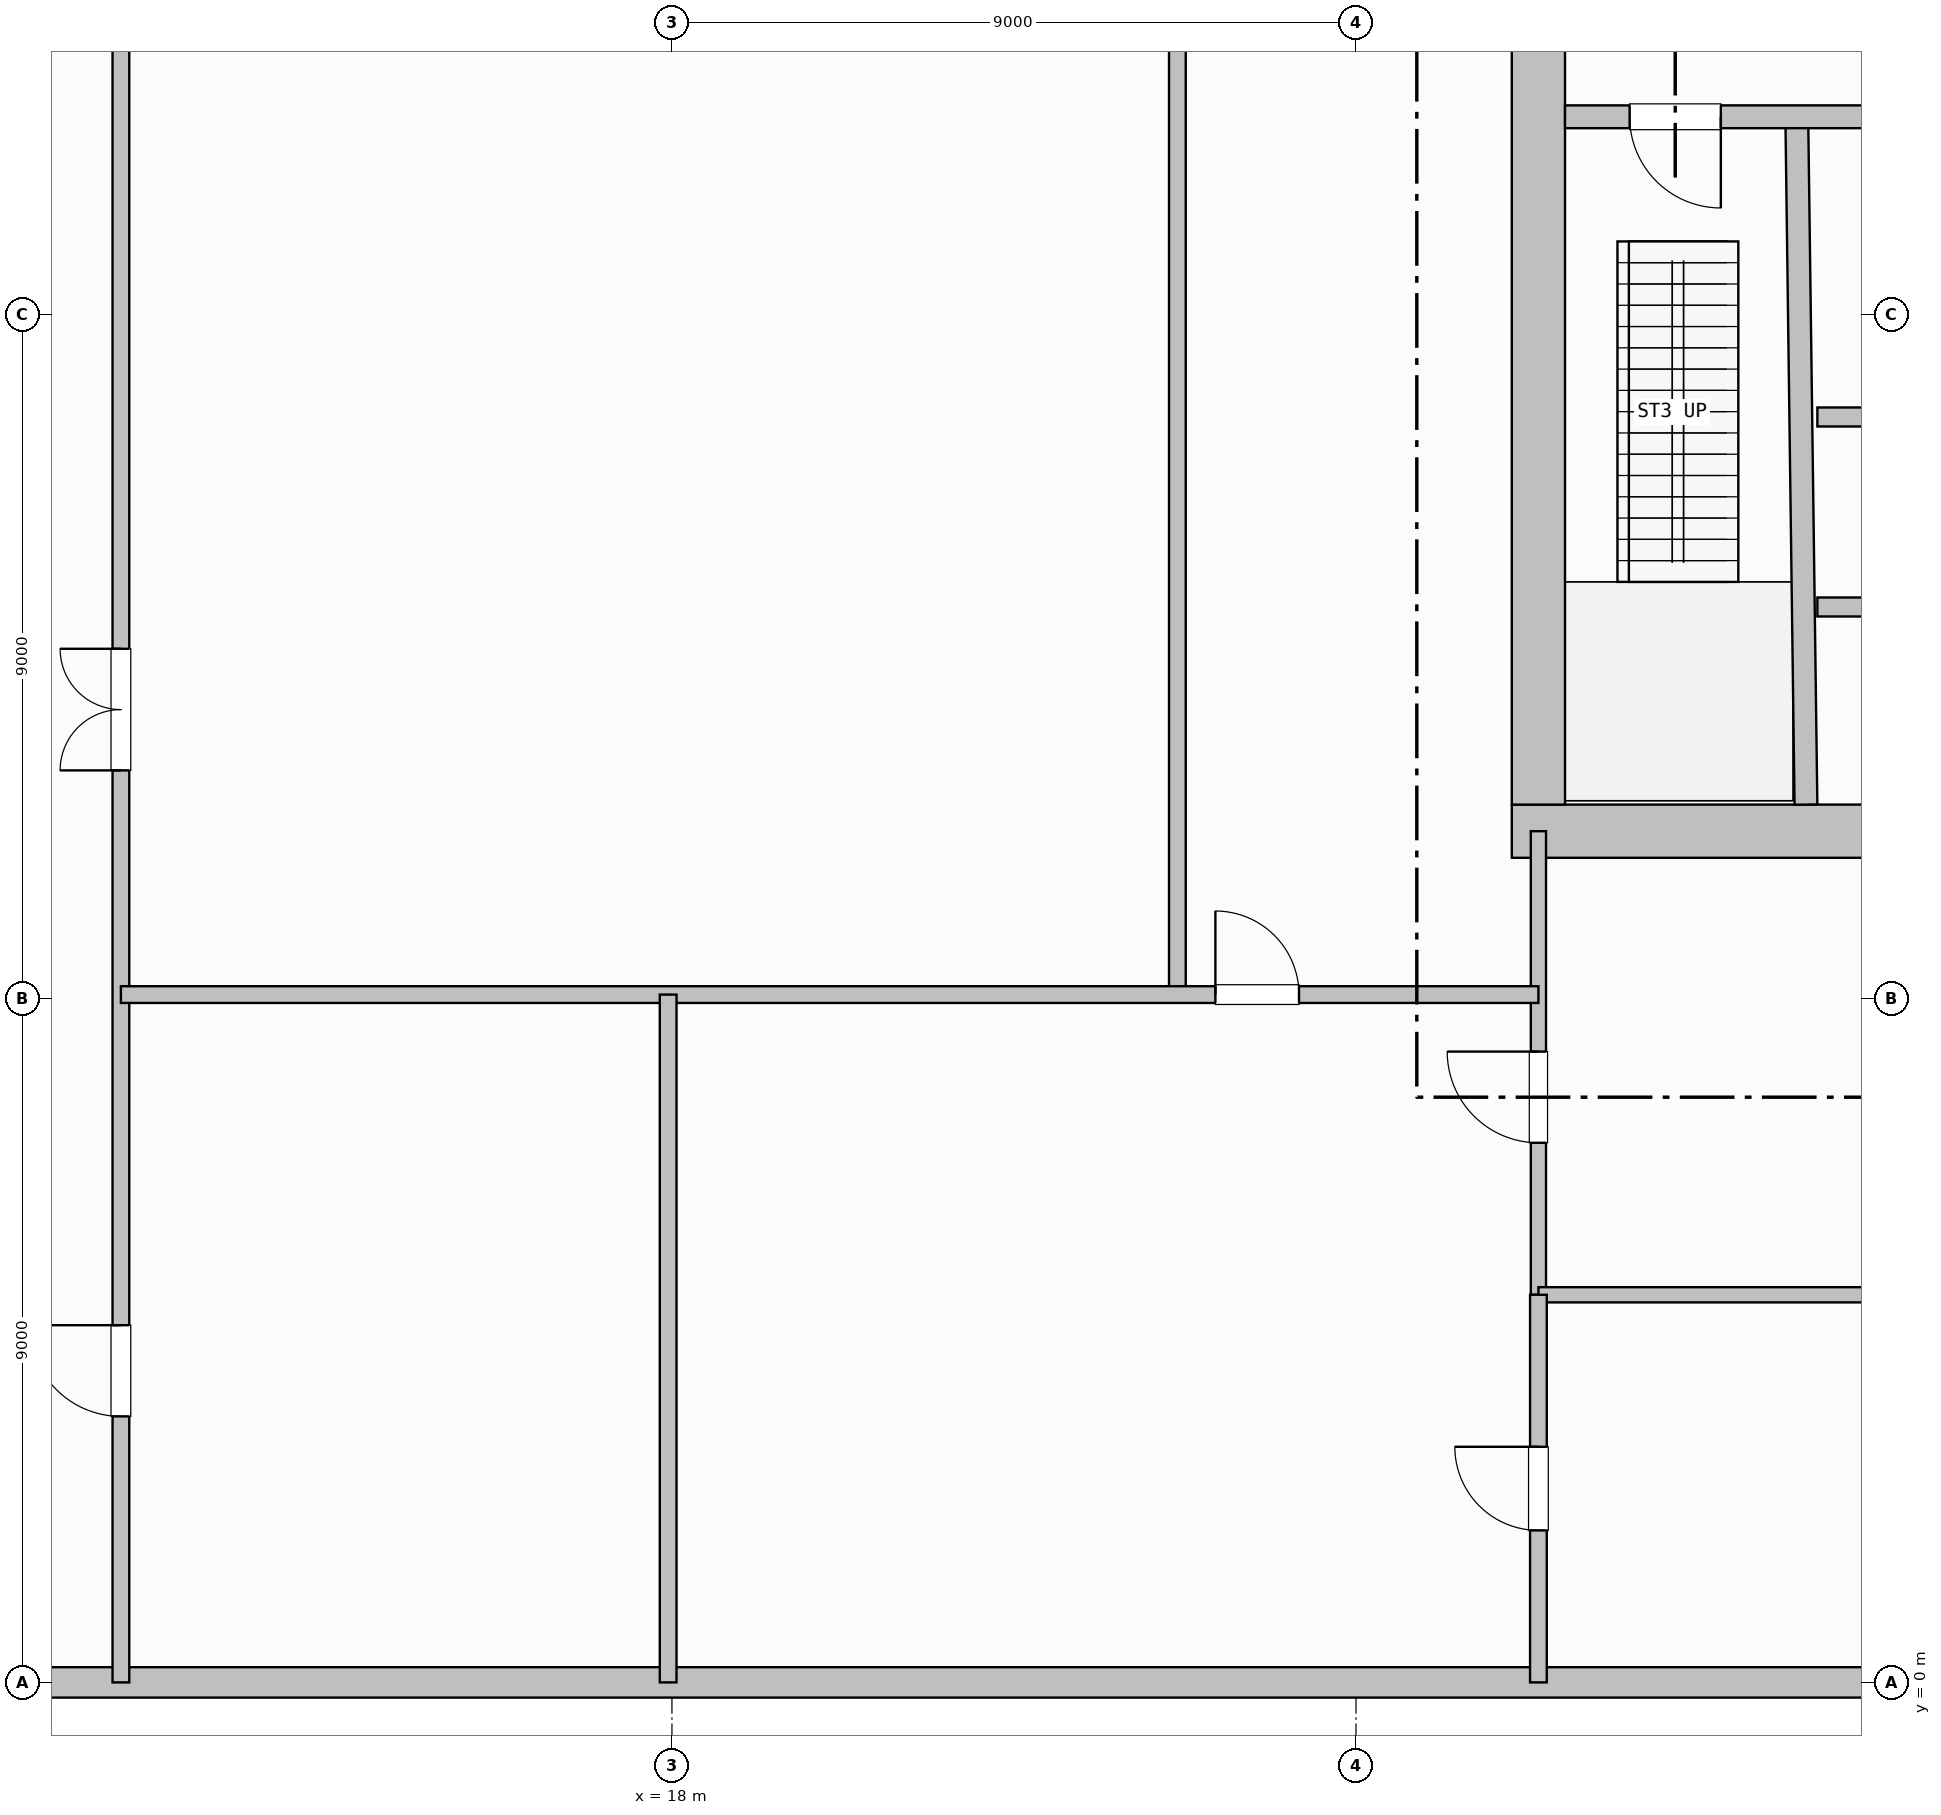
"""IFC4 building model, lengths in metres.
Left out: names, types, materials, properties, quantities, classifications, styles, units other than length and angle.
Written with IfcOpenShell. Run it as: python <this file> out.ifc"""

import sys

from ifc_helpers import new_model, si_unit, direction, frame, frame_2d, origin, origin_2d, place, context, subcontext, project, spatial, rectangle, i_section, extrude, element, fill, save


model = new_model("IFC4")
c1 = context("Model", 3, precision=1e-05, world=origin(), true_north=direction((0.0, 1.0)))
c2 = subcontext(c1, "Body", "Model", "MODEL_VIEW")
j1 = project(units=[si_unit("LENGTHUNIT", "METRE"), si_unit("PLANEANGLEUNIT", "RADIAN")], contexts=[c1])
p1 = place(None, origin())
s1 = spatial("IfcSite", under=j1, at=p1, CompositionType="ELEMENT")
p2 = place(p1, origin())
s2 = spatial("IfcBuilding", under=s1, at=p2, CompositionType="ELEMENT")
p3 = place(p2, origin())
s3 = spatial("IfcBuildingStorey", under=s2, at=p3, CompositionType="ELEMENT", Elevation=0.0)
for number, where, z_axis, x_axis in (
    (1, (18.0, 0.0, 0.0), (0.0, 0.0, 1.0), (1.0, 0.0, 0.0)),
    (2, (18.0, 9.0, 0.0), (0.0, 0.0, 1.0), (1.0, 0.0, 0.0)),
    (3, (27.0, 0.0, 0.0), (0.0, 0.0, 1.0), (1.0, 0.0, 0.0)),
    (4, (27.0, 9.0, 0.0), (0.0, 0.0, 1.0), (1.0, 0.0, 0.0)),
    (5, (18.0, 4.5, 0.0), (0.0, 0.0, 1.0), (1.0, 0.0, 0.0)),
    (6, (27.0, 4.5, 0.0), (0.0, 0.0, 1.0), (1.0, 0.0, 0.0)),
):
    element("IfcColumn", number, at=place(p3, frame(where, z_axis=z_axis, x_axis=x_axis)), inside=s3, PredefinedType="COLUMN", context=c2, shape_type="SweptSolid", body=[
        extrude(i_section(OverallWidth=0.454, OverallDepth=0.569, WebThickness=0.078, FlangeThickness=0.125, FilletRadius=0.015, at=origin_2d()), origin(), (0.0, 0.0, 1.0), 5.8),
    ])
p4 = place(p3, frame((62.8, 0.0, 0.0), z_axis=(0.0, 0.0, 1.0), x_axis=(-1.0, 0.0, 0.0)))
e7 = element("IfcWall", 7, at=p4, inside=s3, PredefinedType="SOLIDWALL", context=c2, shape_type="SweptSolid", body=[
    extrude(rectangle(XDim=62.6, YDim=0.4, at=frame_2d((31.3, 0.0))), origin(), (0.0, 0.0, 1.0), 5.48),
])
p5 = place(p4, frame((57.7, 0.0, 1.1)))
e8 = element("IfcOpeningElement", 8, at=p5, cuts=e7, PredefinedType="OPENING", context=c2, shape_type="SweptSolid", body=[
    extrude(rectangle(XDim=1.2, YDim=1.5, at=frame_2d((0.6, 0.75))), frame((0.0, 0.21, 0.0), z_axis=(0.0, -1.0, 0.0), x_axis=(1.0, 0.0, 0.0)), (0.0, 0.0, 1.0), 0.42),
])
p6 = place(p4, frame((48.1, 0.0, 1.1)))
e9 = element("IfcOpeningElement", 9, at=p6, cuts=e7, PredefinedType="OPENING", context=c2, shape_type="SweptSolid", body=[
    extrude(rectangle(XDim=2.4, YDim=1.95, at=frame_2d((1.2, 0.975))), frame((0.0, 0.21, 0.0), z_axis=(0.0, -1.0, 0.0), x_axis=(1.0, 0.0, 0.0)), (0.0, 0.0, 1.0), 0.42),
])
p7 = place(p4, frame((38.95, 0.0, 1.1)))
e10 = element("IfcOpeningElement", 10, at=p7, cuts=e7, PredefinedType="OPENING", context=c2, shape_type="SweptSolid", body=[
    extrude(rectangle(XDim=2.7, YDim=2.1, at=frame_2d((1.35, 1.05))), frame((0.0, 0.21, 0.0), z_axis=(0.0, -1.0, 0.0), x_axis=(1.0, 0.0, 0.0)), (0.0, 0.0, 1.0), 0.42),
])
p8 = place(p4, frame((29.8, 0.0, 1.1)))
e11 = element("IfcOpeningElement", 11, at=p8, cuts=e7, PredefinedType="OPENING", context=c2, shape_type="SweptSolid", body=[
    extrude(rectangle(XDim=3.0, YDim=2.25, at=frame_2d((1.5, 1.125))), frame((0.0, 0.21, 0.0), z_axis=(0.0, -1.0, 0.0), x_axis=(1.0, 0.0, 0.0)), (0.0, 0.0, 1.0), 0.42),
])
p9 = place(p4, frame((12.175, 0.0, 1.1)))
e12 = element("IfcOpeningElement", 12, at=p9, cuts=e7, PredefinedType="OPENING", context=c2, shape_type="SweptSolid", body=[
    extrude(rectangle(XDim=2.25, YDim=2.1, at=frame_2d((1.125, 1.05))), frame((0.0, 0.21, 0.0), z_axis=(0.0, -1.0, 0.0), x_axis=(1.0, 0.0, 0.0)), (0.0, 0.0, 1.0), 0.42),
])
p10 = place(p4, frame((3.025, 0.0, 1.1)))
e13 = element("IfcOpeningElement", 13, at=p10, cuts=e7, PredefinedType="OPENING", context=c2, shape_type="SweptSolid", body=[
    extrude(rectangle(XDim=2.55, YDim=2.25, at=frame_2d((1.275, 1.125))), frame((0.0, 0.21, 0.0), z_axis=(0.0, -1.0, 0.0), x_axis=(1.0, 0.0, 0.0)), (0.0, 0.0, 1.0), 0.42),
])
p11 = place(p3, frame((43.15, 11.2, 0.0), z_axis=(0.0, 0.0, 1.0), x_axis=(-1.0, 0.0, 0.0)))
e14 = element("IfcWall", 14, at=p11, inside=s3, PredefinedType="SHEAR", context=c2, shape_type="SweptSolid", body=[
    extrude(rectangle(XDim=14.1, YDim=0.7, at=frame_2d((7.05, 0.0))), origin(), (0.0, 0.0, 1.0), 5.48),
])
p12 = place(p3, frame((29.4, 24.25, 0.0), z_axis=(0.0, 0.0, 1.0), x_axis=(0.0, -1.0, 0.0)))
e15 = element("IfcWall", 15, at=p12, inside=s3, PredefinedType="SHEAR", context=c2, shape_type="SweptSolid", body=[
    extrude(rectangle(XDim=12.7, YDim=0.7, at=frame_2d((6.35, 0.0))), origin(), (0.0, 0.0, 1.0), 5.48),
])
p13 = place(p12, frame((1.35, 0.0, 0.0)))
e16 = element("IfcOpeningElement", 16, at=p13, cuts=e15, PredefinedType="OPENING", context=c2, shape_type="SweptSolid", body=[
    extrude(rectangle(XDim=1.35, YDim=2.15, at=frame_2d((0.675, 1.075))), frame((0.0, 0.36, 0.0), z_axis=(0.0, -1.0, 0.0), x_axis=(1.0, 0.0, 0.0)), (0.0, 0.0, 1.0), 0.72),
])
p14 = place(p3, frame((32.92, 11.55, 0.0), z_axis=(0.0, 0.0, 1.0), x_axis=(-0.01331804616, 0.99991131089, 0.0)))
e17 = element("IfcWall", 17, at=p14, inside=s3, PredefinedType="SHEAR", context=c2, shape_type="SweptSolid", body=[
    extrude(rectangle(XDim=9.001, YDim=0.3, at=frame_2d((4.5, 0.0))), origin(), (0.0, 0.0, 1.0), 5.48),
])
p15 = place(p3, frame((34.5, 20.6, 0.0), z_axis=(0.0, 0.0, 1.0), x_axis=(-1.0, 0.0, 0.0)))
e18 = element("IfcWall", 18, at=p15, inside=s3, PredefinedType="SHEAR", context=c2, shape_type="SweptSolid", body=[
    extrude(rectangle(XDim=4.75, YDim=0.3, at=frame_2d((2.375, 0.0))), origin(), (0.0, 0.0, 1.0), 5.48),
])
p16 = place(p15, frame((2.7, 0.0, 0.0)))
e19 = element("IfcOpeningElement", 19, at=p16, cuts=e18, PredefinedType="OPENING", context=c2, shape_type="SweptSolid", body=[
    extrude(rectangle(XDim=1.2, YDim=2.15, at=frame_2d((0.6, 1.075))), frame((0.0, 0.16, 0.0), z_axis=(0.0, -1.0, 0.0), x_axis=(1.0, 0.0, 0.0)), (0.0, 0.0, 1.0), 0.32),
])
p17 = place(p3, frame((33.07, 14.15, 0.0), z_axis=(0.0, 0.0, 1.0), x_axis=(1.0, 0.0, 0.0)))
e20 = element("IfcWall", 20, at=p17, inside=s3, PredefinedType="PARTITIONING", context=c2, shape_type="SweptSolid", body=[
    extrude(rectangle(XDim=9.38, YDim=0.25, at=frame_2d((4.69, 0.0))), origin(), (0.0, 0.0, 1.0), 5.48),
])
p18 = place(p17, frame((0.755, 0.0, 0.0)))
e21 = element("IfcOpeningElement", 21, at=p18, cuts=e20, PredefinedType="OPENING", context=c2, shape_type="SweptSolid", body=[
    extrude(rectangle(XDim=1.15, YDim=2.15, at=frame_2d((0.575, 1.075))), frame((0.0, 0.135, 0.0), z_axis=(0.0, -1.0, 0.0), x_axis=(1.0, 0.0, 0.0)), (0.0, 0.0, 1.0), 0.27),
])
p19 = place(p17, frame((3.355, 0.0, 0.0)))
e22 = element("IfcOpeningElement", 22, at=p19, cuts=e20, PredefinedType="OPENING", context=c2, shape_type="SweptSolid", body=[
    extrude(rectangle(XDim=1.15, YDim=2.15, at=frame_2d((0.575, 1.075))), frame((0.0, 0.135, 0.0), z_axis=(0.0, -1.0, 0.0), x_axis=(1.0, 0.0, 0.0)), (0.0, 0.0, 1.0), 0.27),
])
p20 = place(p17, frame((6.055, 0.0, 0.0)))
e23 = element("IfcOpeningElement", 23, at=p20, cuts=e20, PredefinedType="OPENING", context=c2, shape_type="SweptSolid", body=[
    extrude(rectangle(XDim=1.15, YDim=2.15, at=frame_2d((0.575, 1.075))), frame((0.0, 0.135, 0.0), z_axis=(0.0, -1.0, 0.0), x_axis=(1.0, 0.0, 0.0)), (0.0, 0.0, 1.0), 0.27),
])
p21 = place(p3, frame((40.98, 16.65, 0.0), z_axis=(0.0, 0.0, 1.0), x_axis=(-1.0, 0.0, 0.0)))
e24 = element("IfcWall", 24, at=p21, inside=s3, PredefinedType="PARTITIONING", context=c2, shape_type="SweptSolid", body=[
    extrude(rectangle(XDim=7.91, YDim=0.25, at=frame_2d((3.955, 0.0))), origin(), (0.0, 0.0, 1.0), 5.48),
])
p22 = place(p21, frame((6.005, 0.0, 0.0)))
e25 = element("IfcOpeningElement", 25, at=p22, cuts=e24, PredefinedType="OPENING", context=c2, shape_type="SweptSolid", body=[
    extrude(rectangle(XDim=1.15, YDim=2.15, at=frame_2d((0.575, 1.075))), frame((0.0, 0.135, 0.0), z_axis=(0.0, -1.0, 0.0), x_axis=(1.0, 0.0, 0.0)), (0.0, 0.0, 1.0), 0.27),
])
p23 = place(p21, frame((3.405, 0.0, 0.0)))
e26 = element("IfcOpeningElement", 26, at=p23, cuts=e24, PredefinedType="OPENING", context=c2, shape_type="SweptSolid", body=[
    extrude(rectangle(XDim=1.15, YDim=2.15, at=frame_2d((0.575, 1.075))), frame((0.0, 0.135, 0.0), z_axis=(0.0, -1.0, 0.0), x_axis=(1.0, 0.0, 0.0)), (0.0, 0.0, 1.0), 0.27),
])
p24 = place(p21, frame((0.705, 0.0, 0.0)))
e27 = element("IfcOpeningElement", 27, at=p24, cuts=e24, PredefinedType="OPENING", context=c2, shape_type="SweptSolid", body=[
    extrude(rectangle(XDim=1.15, YDim=2.15, at=frame_2d((0.575, 1.075))), frame((0.0, 0.135, 0.0), z_axis=(0.0, -1.0, 0.0), x_axis=(1.0, 0.0, 0.0)), (0.0, 0.0, 1.0), 0.27),
])
p25 = place(p3, frame((29.4, 5.1, 0.0), z_axis=(0.0, 0.0, 1.0), x_axis=(0.0, 1.0, 0.0)))
e28 = element("IfcWall", 28, at=p25, inside=s3, PredefinedType="PARTITIONING", context=c2, shape_type="SweptSolid", body=[
    extrude(rectangle(XDim=6.1, YDim=0.2, at=frame_2d((3.05, 0.0))), origin(), (0.0, 0.0, 1.0), 4.533),
])
p26 = place(p25, frame((2.0, 0.0, 0.0)))
e29 = element("IfcOpeningElement", 29, at=p26, cuts=e28, PredefinedType="OPENING", context=c2, shape_type="SweptSolid", body=[
    extrude(rectangle(XDim=1.2, YDim=2.15, at=frame_2d((0.6, 1.075))), frame((0.0, 0.11, 0.0), z_axis=(0.0, -1.0, 0.0), x_axis=(1.0, 0.0, 0.0)), (0.0, 0.0, 1.0), 0.22),
])
p27 = place(p3, frame((29.4, 5.1, 0.0), z_axis=(0.0, 0.0, 1.0), x_axis=(1.0, 0.0, 0.0)))
e30 = element("IfcWall", 30, at=p27, inside=s3, PredefinedType="PARTITIONING", context=c2, shape_type="SweptSolid", body=[
    extrude(rectangle(XDim=33.6, YDim=0.2, at=frame_2d((16.8, 0.0))), origin(), (0.0, 0.0, 1.0), 4.605),
])
p28 = place(p3, frame((10.75, 0.0, 0.0), z_axis=(0.0, 0.0, 1.0), x_axis=(0.0, 1.0, 0.0)))
e31 = element("IfcWall", 31, at=p28, inside=s3, PredefinedType="PARTITIONING", context=c2, shape_type="SweptSolid", body=[
    extrude(rectangle(XDim=25.0, YDim=0.22, at=frame_2d((12.5, 0.0))), origin(), (0.0, 0.0, 1.0), 4.512),
])
p29 = place(p28, frame((12.0, 0.0, 0.0)))
e32 = element("IfcOpeningElement", 32, at=p29, cuts=e31, PredefinedType="OPENING", context=c2, shape_type="SweptSolid", body=[
    extrude(rectangle(XDim=1.6, YDim=2.2, at=frame_2d((0.8, 1.1))), frame((0.0, 0.12, 0.0), z_axis=(0.0, -1.0, 0.0), x_axis=(1.0, 0.0, 0.0)), (0.0, 0.0, 1.0), 0.24),
])
p30 = place(p28, frame((3.5, 0.0, 0.0)))
e33 = element("IfcOpeningElement", 33, at=p30, cuts=e31, PredefinedType="OPENING", context=c2, shape_type="SweptSolid", body=[
    extrude(rectangle(XDim=1.2, YDim=2.15, at=frame_2d((0.6, 1.075))), frame((0.0, 0.12, 0.0), z_axis=(0.0, -1.0, 0.0), x_axis=(1.0, 0.0, 0.0)), (0.0, 0.0, 1.0), 0.24),
])
p31 = place(p3, frame((24.65, 9.05, 0.0), z_axis=(0.0, 0.0, 1.0), x_axis=(0.0, 1.0, 0.0)))
e34 = element("IfcWall", 34, at=p31, inside=s3, PredefinedType="PARTITIONING", context=c2, shape_type="SweptSolid", body=[
    extrude(rectangle(XDim=19.15, YDim=0.22, at=frame_2d((9.575, 0.0))), origin(), (0.0, 0.0, 1.0), 4.512),
])
p32 = place(p3, frame((10.75, 9.05, 0.0), z_axis=(0.0, 0.0, 1.0), x_axis=(1.0, 0.0, 0.0)))
e35 = element("IfcWall", 35, at=p32, inside=s3, PredefinedType="PARTITIONING", context=c2, shape_type="SweptSolid", body=[
    extrude(rectangle(XDim=18.65, YDim=0.22, at=frame_2d((9.325, 0.0))), origin(), (0.0, 0.0, 1.0), 4.533),
])
p33 = place(p32, frame((14.4, 0.0, 0.0)))
e36 = element("IfcOpeningElement", 36, at=p33, cuts=e35, PredefinedType="OPENING", context=c2, shape_type="SweptSolid", body=[
    extrude(rectangle(XDim=1.1, YDim=2.15, at=frame_2d((0.55, 1.075))), frame((0.0, 0.12, 0.0), z_axis=(0.0, -1.0, 0.0), x_axis=(1.0, 0.0, 0.0)), (0.0, 0.0, 1.0), 0.24),
])
p34 = place(p3, frame((17.95, 0.0, 0.0), z_axis=(0.0, 0.0, 1.0), x_axis=(0.0, 1.0, 0.0)))
e37 = element("IfcWall", 37, at=p34, inside=s3, PredefinedType="PARTITIONING", context=c2, shape_type="SweptSolid", body=[
    extrude(rectangle(XDim=9.05, YDim=0.22, at=frame_2d((4.525, 0.0))), origin(), (0.0, 0.0, 1.0), 4.533),
])
p35 = place(p3, frame((29.4, 0.0, 0.0), z_axis=(0.0, 0.0, 1.0), x_axis=(0.0, 1.0, 0.0)))
e38 = element("IfcWall", 38, at=p35, inside=s3, PredefinedType="PARTITIONING", context=c2, shape_type="SweptSolid", body=[
    extrude(rectangle(XDim=5.1, YDim=0.22, at=frame_2d((2.55, 0.0))), origin(), (0.0, 0.0, 1.0), 4.533),
])
p36 = place(p35, frame((2.0, 0.0, 0.0)))
e39 = element("IfcOpeningElement", 39, at=p36, cuts=e38, PredefinedType="OPENING", context=c2, shape_type="SweptSolid", body=[
    extrude(rectangle(XDim=1.1, YDim=2.15, at=frame_2d((0.55, 1.075))), frame((0.0, 0.12, 0.0), z_axis=(0.0, -1.0, 0.0), x_axis=(1.0, 0.0, 0.0)), (0.0, 0.0, 1.0), 0.24),
])
p37 = place(p6, origin())
e40 = element("IfcWindow", 40, at=p37, inside=s3, PartitioningType="SINGLE_PANEL", PredefinedType="WINDOW", context=c2, shape_type="SweptSolid", body=[
    extrude(rectangle(XDim=2.4, YDim=1.95, at=frame_2d((1.2, 0.975))), frame((0.0, 0.03, 0.0), z_axis=(0.0, -1.0, 0.0), x_axis=(1.0, 0.0, 0.0)), (0.0, 0.0, 1.0), 0.06),
])
fill(e9, e40)
p38 = place(p7, origin())
e41 = element("IfcWindow", 41, at=p38, inside=s3, PartitioningType="SINGLE_PANEL", PredefinedType="WINDOW", context=c2, shape_type="SweptSolid", body=[
    extrude(rectangle(XDim=2.7, YDim=2.1, at=frame_2d((1.35, 1.05))), frame((0.0, 0.03, 0.0), z_axis=(0.0, -1.0, 0.0), x_axis=(1.0, 0.0, 0.0)), (0.0, 0.0, 1.0), 0.06),
])
fill(e10, e41)
p39 = place(p8, origin())
e42 = element("IfcWindow", 42, at=p39, inside=s3, PartitioningType="SINGLE_PANEL", PredefinedType="WINDOW", context=c2, shape_type="SweptSolid", body=[
    extrude(rectangle(XDim=3.0, YDim=2.25, at=frame_2d((1.5, 1.125))), frame((0.0, 0.03, 0.0), z_axis=(0.0, -1.0, 0.0), x_axis=(1.0, 0.0, 0.0)), (0.0, 0.0, 1.0), 0.06),
])
fill(e11, e42)
p40 = place(p16, origin())
e43 = element("IfcDoor", 43, at=p40, inside=s3, OperationType="SINGLE_SWING_LEFT", PredefinedType="DOOR", context=c2, shape_type="SweptSolid", body=[
    extrude(rectangle(XDim=1.2, YDim=2.15, at=frame_2d((0.6, 1.075))), frame((0.0, 0.025, 0.0), z_axis=(0.0, -1.0, 0.0), x_axis=(1.0, 0.0, 0.0)), (0.0, 0.0, 1.0), 0.05),
])
fill(e19, e43)
p41 = place(p26, origin())
e44 = element("IfcDoor", 44, at=p41, inside=s3, OperationType="SINGLE_SWING_RIGHT", PredefinedType="DOOR", context=c2, shape_type="SweptSolid", body=[
    extrude(rectangle(XDim=1.2, YDim=2.15, at=frame_2d((0.6, 1.075))), frame((0.0, 0.025, 0.0), z_axis=(0.0, -1.0, 0.0), x_axis=(1.0, 0.0, 0.0)), (0.0, 0.0, 1.0), 0.05),
])
fill(e29, e44)
p42 = place(p29, origin())
e45 = element("IfcDoor", 45, at=p42, inside=s3, OperationType="DOUBLE_DOOR_SINGLE_SWING", PredefinedType="DOOR", context=c2, shape_type="SweptSolid", body=[
    extrude(rectangle(XDim=1.6, YDim=2.2, at=frame_2d((0.8, 1.1))), frame((0.0, 0.025, 0.0), z_axis=(0.0, -1.0, 0.0), x_axis=(1.0, 0.0, 0.0)), (0.0, 0.0, 1.0), 0.05),
])
fill(e32, e45)
p43 = place(p30, origin())
e46 = element("IfcDoor", 46, at=p43, inside=s3, OperationType="SINGLE_SWING_RIGHT", PredefinedType="DOOR", context=c2, shape_type="SweptSolid", body=[
    extrude(rectangle(XDim=1.2, YDim=2.15, at=frame_2d((0.6, 1.075))), frame((0.0, 0.025, 0.0), z_axis=(0.0, -1.0, 0.0), x_axis=(1.0, 0.0, 0.0)), (0.0, 0.0, 1.0), 0.05),
])
fill(e33, e46)
p44 = place(p33, origin())
e47 = element("IfcDoor", 47, at=p44, inside=s3, OperationType="SINGLE_SWING_LEFT", PredefinedType="DOOR", context=c2, shape_type="SweptSolid", body=[
    extrude(rectangle(XDim=1.1, YDim=2.15, at=frame_2d((0.55, 1.075))), frame((0.0, 0.025, 0.0), z_axis=(0.0, -1.0, 0.0), x_axis=(1.0, 0.0, 0.0)), (0.0, 0.0, 1.0), 0.05),
])
fill(e36, e47)
p45 = place(p36, origin())
e48 = element("IfcDoor", 48, at=p45, inside=s3, OperationType="SINGLE_SWING_RIGHT", PredefinedType="DOOR", context=c2, shape_type="SweptSolid", body=[
    extrude(rectangle(XDim=1.1, YDim=2.15, at=frame_2d((0.55, 1.075))), frame((0.0, 0.025, 0.0), z_axis=(0.0, -1.0, 0.0), x_axis=(1.0, 0.0, 0.0)), (0.0, 0.0, 1.0), 0.05),
])
fill(e39, e48)
save(model, sys.argv[1])
